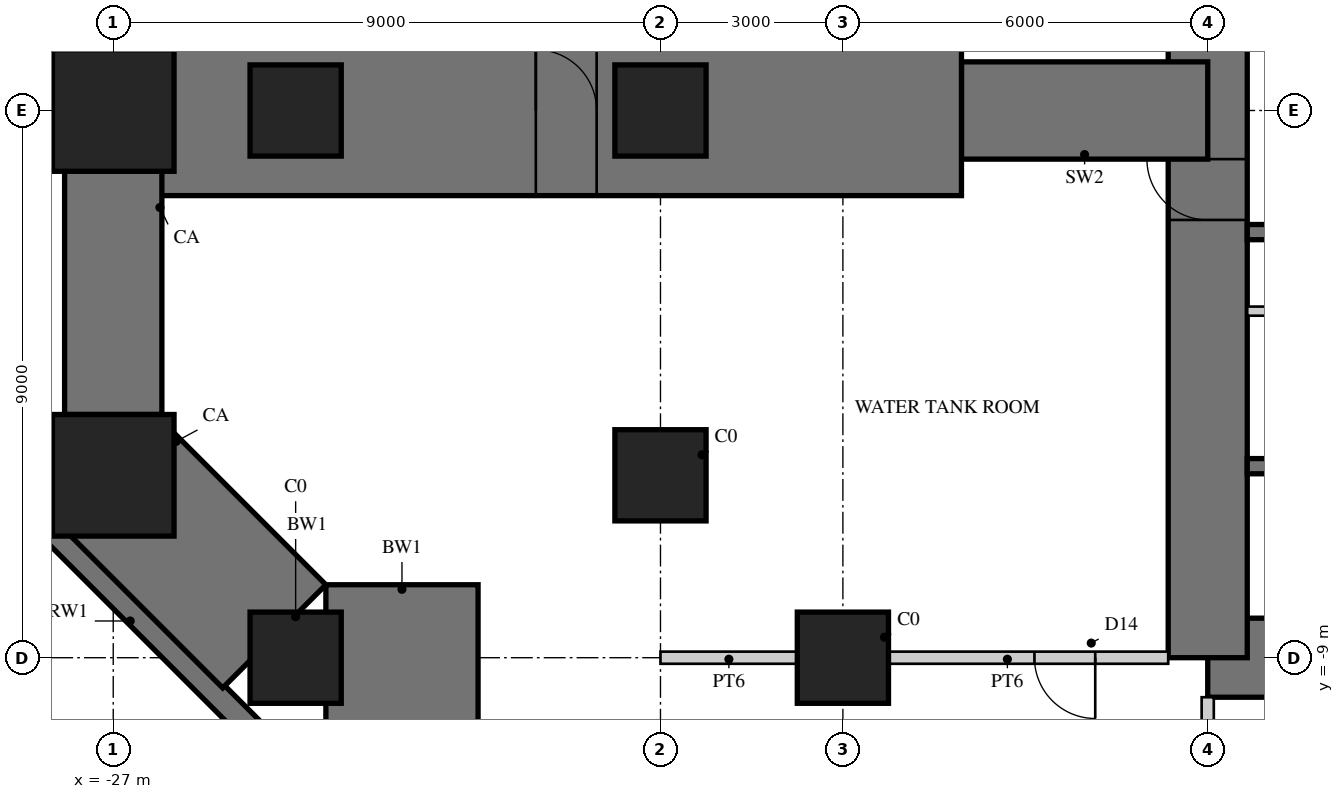
"""IFC4 building model, lengths in metres.
Left out: names, types, materials, properties, quantities, classifications, styles, units other than length and angle.
Written with IfcOpenShell. Run it as: python <this file> out.ifc"""

import sys

from ifc_helpers import new_model, si_unit, direction, frame, frame_2d, origin, origin_2d, place, context, subcontext, project, spatial, polyline, rectangle, outline, extrude, element, fill, save


model = new_model("IFC4")
c1 = context("Model", 3, precision=1e-05, world=origin(), true_north=direction((0.0, 1.0)))
c2 = subcontext(c1, "Body", "Model", "MODEL_VIEW")
j1 = project(units=[si_unit("LENGTHUNIT", "METRE"), si_unit("PLANEANGLEUNIT", "RADIAN")], contexts=[c1])
p1 = place(None, origin())
s1 = spatial("IfcSite", under=j1, at=p1, CompositionType="ELEMENT")
p2 = place(p1, origin())
s2 = spatial("IfcBuilding", under=s1, at=p2, CompositionType="ELEMENT")
p3 = place(p2, frame((0.0, 0.0, -8.0)))
s3 = spatial("IfcBuildingStorey", under=s2, at=p3, CompositionType="ELEMENT", Elevation=-8.0)
p4 = place(p3, origin())
e1 = element("IfcWall", 1, at=p4, inside=s3, PredefinedType="SOLIDWALL", context=c2, shape_type="SweptSolid", body=[
    extrude(outline(polyline([(-24.476, -10.15), (-24.642, -10.55), (-28.55, -6.642), (-28.15, -6.476), (-24.476, -10.15)])), origin(), (0.0, 0.0, 1.0), 4.0),
])
p5 = place(p3, frame((-9.0, -9.0, 0.0), z_axis=(0.0, 0.0, 1.0), x_axis=(1.0, 0.0, 0.0)))
e2 = element("IfcWall", 2, at=p5, inside=s3, PredefinedType="SHEAR", context=c2, shape_type="SweptSolid", body=[
    extrude(rectangle(XDim=18.0, YDim=1.3, at=frame_2d((9.0, 0.0))), origin(), (0.0, 0.0, 1.0), 4.0),
])
p6 = place(p5, frame((9.8, 0.0, 0.0)))
e3 = element("IfcOpeningElement", 3, at=p6, cuts=e2, PredefinedType="OPENING", context=c2, shape_type="SweptSolid", body=[
    extrude(rectangle(XDim=1.0, YDim=2.4, at=frame_2d((0.5, 1.2))), frame((0.0, 0.66, 0.0), z_axis=(0.0, -1.0, 0.0), x_axis=(1.0, 0.0, 0.0)), (0.0, 0.0, 1.0), 1.32),
])
p7 = place(p3, frame((-9.0, 9.0, 0.0), z_axis=(0.0, 0.0, 1.0), x_axis=(0.0, -1.0, 0.0)))
e4 = element("IfcWall", 4, at=p7, inside=s3, PredefinedType="SHEAR", context=c2, shape_type="SweptSolid", body=[
    extrude(rectangle(XDim=18.0, YDim=1.3, at=frame_2d((9.0, 0.0))), origin(), (0.0, 0.0, 1.0), 4.0),
])
p8 = place(p7, frame((9.8, 0.0, 0.0)))
e5 = element("IfcOpeningElement", 5, at=p8, cuts=e4, PredefinedType="OPENING", context=c2, shape_type="SweptSolid", body=[
    extrude(rectangle(XDim=1.0, YDim=2.4, at=frame_2d((0.5, 1.2))), frame((0.0, 0.66, 0.0), z_axis=(0.0, -1.0, 0.0), x_axis=(1.0, 0.0, 0.0)), (0.0, 0.0, 1.0), 1.32),
])
for number, where, z_axis, x_axis in (
    (6, (-1.925, -2.0, 0.0), (0.0, 0.0, 1.0), (-1.0, 0.0, 0.0)),
    (7, (-1.925, -5.85, 0.0), (0.0, 0.0, 1.0), (-1.0, 0.0, 0.0)),
):
    element("IfcWall", number, at=place(p3, frame(where, z_axis=z_axis, x_axis=x_axis)), inside=s3, PredefinedType="SHEAR", context=c2, shape_type="SweptSolid", body=[
        extrude(rectangle(XDim=6.425, YDim=0.25, at=frame_2d((3.212, 0.0))), origin(), (0.0, 0.0, 1.0), 4.0),
    ])
p9 = place(p3, frame((-1.925, -3.3, 0.0), z_axis=(0.0, 0.0, 1.0), x_axis=(-1.0, 0.0, 0.0)))
e8 = element("IfcWall", 8, at=p9, inside=s3, PredefinedType="PARTITIONING", context=c2, shape_type="SweptSolid", body=[
    extrude(rectangle(XDim=6.425, YDim=0.15, at=frame_2d((3.212, 0.0))), origin(), (0.0, 0.0, 1.0), 4.0),
])
p10 = place(p9, frame((0.075, 0.0, 0.0)))
e9 = element("IfcOpeningElement", 9, at=p10, cuts=e8, PredefinedType="OPENING", context=c2, shape_type="SweptSolid", body=[
    extrude(rectangle(XDim=0.8, YDim=2.1, at=frame_2d((0.4, 1.05))), frame((0.0, 0.085, 0.0), z_axis=(0.0, -1.0, 0.0), x_axis=(1.0, 0.0, 0.0)), (0.0, 0.0, 1.0), 0.17),
])
p11 = place(p9, frame((3.675, 0.0, 0.0)))
e10 = element("IfcOpeningElement", 10, at=p11, cuts=e8, PredefinedType="OPENING", context=c2, shape_type="SweptSolid", body=[
    extrude(rectangle(XDim=0.8, YDim=2.1, at=frame_2d((0.4, 1.05))), frame((0.0, 0.085, 0.0), z_axis=(0.0, -1.0, 0.0), x_axis=(1.0, 0.0, 0.0)), (0.0, 0.0, 1.0), 0.17),
])
p12 = place(p3, frame((-9.0, 0.0, 0.0), z_axis=(0.0, 0.0, 1.0), x_axis=(-1.0, 0.0, 0.0)))
e11 = element("IfcWall", 11, at=p12, inside=s3, PredefinedType="SHEAR", context=c2, shape_type="SweptSolid", body=[
    extrude(rectangle(XDim=4.05, YDim=1.6, at=frame_2d((2.025, 0.0))), origin(), (0.0, 0.0, 1.0), 4.0),
])
p13 = place(p3, frame((-13.05, 0.0, 0.0), z_axis=(0.0, 0.0, 1.0), x_axis=(-1.0, 0.0, 0.0)))
e12 = element("IfcWall", 12, at=p13, inside=s3, PredefinedType="SHEAR", context=c2, shape_type="SweptSolid", body=[
    extrude(rectangle(XDim=13.95, YDim=2.8, at=frame_2d((6.975, 0.0))), origin(), (0.0, 0.0, 1.0), 4.0),
])
p14 = place(p13, frame((6.0, 0.0, 0.0)))
e13 = element("IfcOpeningElement", 13, at=p14, cuts=e12, PredefinedType="OPENING", context=c2, shape_type="SweptSolid", body=[
    extrude(rectangle(XDim=1.0, YDim=2.2, at=frame_2d((0.5, 1.1))), frame((0.0, 1.41, 0.0), z_axis=(0.0, -1.0, 0.0), x_axis=(1.0, 0.0, 0.0)), (0.0, 0.0, 1.0), 2.82),
])
p15 = place(p3, frame((-21.0, -9.0, 0.0), z_axis=(0.0, 0.0, 1.0), x_axis=(-1.0, 0.0, 0.0)))
e14 = element("IfcWall", 14, at=p15, inside=s3, PredefinedType="SHEAR", context=c2, shape_type="SweptSolid", body=[
    extrude(rectangle(XDim=2.503, YDim=2.4, at=frame_2d((1.251, 0.0))), origin(), (0.0, 0.0, 1.0), 4.0),
])
p16 = place(p3, frame((-24.352, -8.648, 0.0), z_axis=(0.0, 0.0, 1.0), x_axis=(-0.707106781187, 0.707106781187, 0.0)))
e15 = element("IfcWall", 15, at=p16, inside=s3, PredefinedType="SHEAR", context=c2, shape_type="SweptSolid", body=[
    extrude(rectangle(XDim=3.745, YDim=2.4, at=frame_2d((1.873, 0.0))), origin(), (0.0, 0.0, 1.0), 4.0),
])
p17 = place(p3, frame((-27.0, 5.0, 0.0), z_axis=(0.0, 0.0, 1.0), x_axis=(0.0, -1.0, 0.0)))
e16 = element("IfcWall", 16, at=p17, inside=s3, PredefinedType="SHEAR", context=c2, shape_type="SweptSolid", body=[
    extrude(rectangle(XDim=10.0, YDim=1.6, at=frame_2d((5.0, 0.0))), origin(), (0.0, 0.0, 1.0), 4.0),
])
for number, where, z_axis, x_axis in (
    (17, (-15.0, -9.0, 0.0), (0.0, 0.0, 1.0), (1.0, 0.0, 0.0)),
    (18, (-24.0, -9.0, 0.0), (0.0, 0.0, 1.0), (1.0, 0.0, 0.0)),
):
    element("IfcColumn", number, at=place(p3, frame(where, z_axis=z_axis, x_axis=x_axis)), inside=s3, PredefinedType="COLUMN", context=c2, shape_type="SweptSolid", body=[
        extrude(rectangle(XDim=1.5, YDim=1.5, at=origin_2d()), origin(), (0.0, 0.0, 1.0), 4.0),
    ])
for number, where, z_axis, x_axis in (
    (19, (-27.0, 0.0, 0.0), (0.0, 0.0, 1.0), (1.0, 0.0, 0.0)),
    (20, (-27.0, -6.0, 0.0), (0.0, 0.0, 1.0), (1.0, 0.0, 0.0)),
):
    element("IfcColumn", number, at=place(p3, frame(where, z_axis=z_axis, x_axis=x_axis)), inside=s3, PredefinedType="COLUMN", context=c2, shape_type="SweptSolid", body=[
        extrude(rectangle(XDim=2.0, YDim=2.0, at=origin_2d()), origin(), (0.0, 0.0, 1.0), 4.0),
    ])
for number, where, z_axis, x_axis in (
    (21, (-18.0, 0.0, 0.0), (0.0, 0.0, 1.0), (1.0, 0.0, 0.0)),
    (22, (-18.0, -6.0, 0.0), (0.0, 0.0, 1.0), (1.0, 0.0, 0.0)),
    (23, (-24.0, 0.0, 0.0), (0.0, 0.0, 1.0), (1.0, 0.0, 0.0)),
):
    element("IfcColumn", number, at=place(p3, frame(where, z_axis=z_axis, x_axis=x_axis)), inside=s3, PredefinedType="COLUMN", context=c2, shape_type="SweptSolid", body=[
        extrude(rectangle(XDim=1.5, YDim=1.5, at=origin_2d()), origin(), (0.0, 0.0, 1.0), 4.0),
    ])
p18 = place(p3, frame((-9.65, -9.0, 0.0), z_axis=(0.0, 0.0, 1.0), x_axis=(-1.0, 0.0, 0.0)))
e24 = element("IfcWall", 24, at=p18, inside=s3, PredefinedType="SOLIDWALL", context=c2, shape_type="SweptSolid", body=[
    extrude(rectangle(XDim=4.6, YDim=0.2, at=frame_2d((2.3, 0.0))), origin(), (0.0, 0.0, 1.0), 2.75),
])
p19 = place(p18, frame((1.2, 0.0, 0.0)))
e25 = element("IfcOpeningElement", 25, at=p19, cuts=e24, PredefinedType="OPENING", context=c2, shape_type="SweptSolid", body=[
    extrude(rectangle(XDim=1.0, YDim=2.2, at=frame_2d((0.5, 1.1))), frame((0.0, 0.11, 0.0), z_axis=(0.0, -1.0, 0.0), x_axis=(1.0, 0.0, 0.0)), (0.0, 0.0, 1.0), 0.22),
])
p20 = place(p3, frame((-15.75, -9.0, 0.0), z_axis=(0.0, 0.0, 1.0), x_axis=(-1.0, 0.0, 0.0)))
e26 = element("IfcWall", 26, at=p20, inside=s3, PredefinedType="SOLIDWALL", context=c2, shape_type="SweptSolid", body=[
    extrude(rectangle(XDim=2.25, YDim=0.2, at=frame_2d((1.125, 0.0))), origin(), (0.0, 0.0, 1.0), 2.75),
])
p21 = place(p3, frame((-9.0, -14.25, 0.0), z_axis=(0.0, 0.0, 1.0), x_axis=(0.0, 1.0, 0.0)))
e27 = element("IfcWall", 27, at=p21, inside=s3, PredefinedType="SOLIDWALL", context=c2, shape_type="SweptSolid", body=[
    extrude(rectangle(XDim=4.6, YDim=0.2, at=frame_2d((2.3, 0.0))), origin(), (0.0, 0.0, 1.0), 2.75),
])
p22 = place(p19, origin())
e28 = element("IfcDoor", 28, at=p22, inside=s3, OperationType="SINGLE_SWING_LEFT", PredefinedType="DOOR", context=c2, shape_type="SweptSolid", body=[
    extrude(rectangle(XDim=1.0, YDim=2.2, at=frame_2d((0.5, 1.1))), frame((0.0, 0.025, 0.0), z_axis=(0.0, -1.0, 0.0), x_axis=(1.0, 0.0, 0.0)), (0.0, 0.0, 1.0), 0.05),
])
fill(e25, e28)
p23 = place(p14, frame((1.0, 0.0, 0.0), z_axis=(0.0, 0.0, 1.0), x_axis=(-1.0, 0.0, 0.0)))
e29 = element("IfcDoor", 29, at=p23, inside=s3, OperationType="SINGLE_SWING_LEFT", PredefinedType="DOOR", context=c2, shape_type="SweptSolid", body=[
    extrude(rectangle(XDim=1.0, YDim=2.2, at=frame_2d((0.5, 1.1))), frame((0.0, 0.025, 0.0), z_axis=(0.0, -1.0, 0.0), x_axis=(1.0, 0.0, 0.0)), (0.0, 0.0, 1.0), 0.05),
])
fill(e13, e29)
p24 = place(p8, frame((1.0, 0.0, 0.0), z_axis=(0.0, 0.0, 1.0), x_axis=(-1.0, 0.0, 0.0)))
e30 = element("IfcDoor", 30, at=p24, inside=s3, OperationType="SINGLE_SWING_RIGHT", PredefinedType="DOOR", context=c2, shape_type="SweptSolid", body=[
    extrude(rectangle(XDim=1.0, YDim=2.4, at=frame_2d((0.5, 1.2))), frame((0.0, -0.005, 0.0), z_axis=(0.0, -1.0, 0.0), x_axis=(1.0, 0.0, 0.0)), (0.0, 0.0, 1.0), 0.05),
])
fill(e5, e30)
save(model, sys.argv[1])
